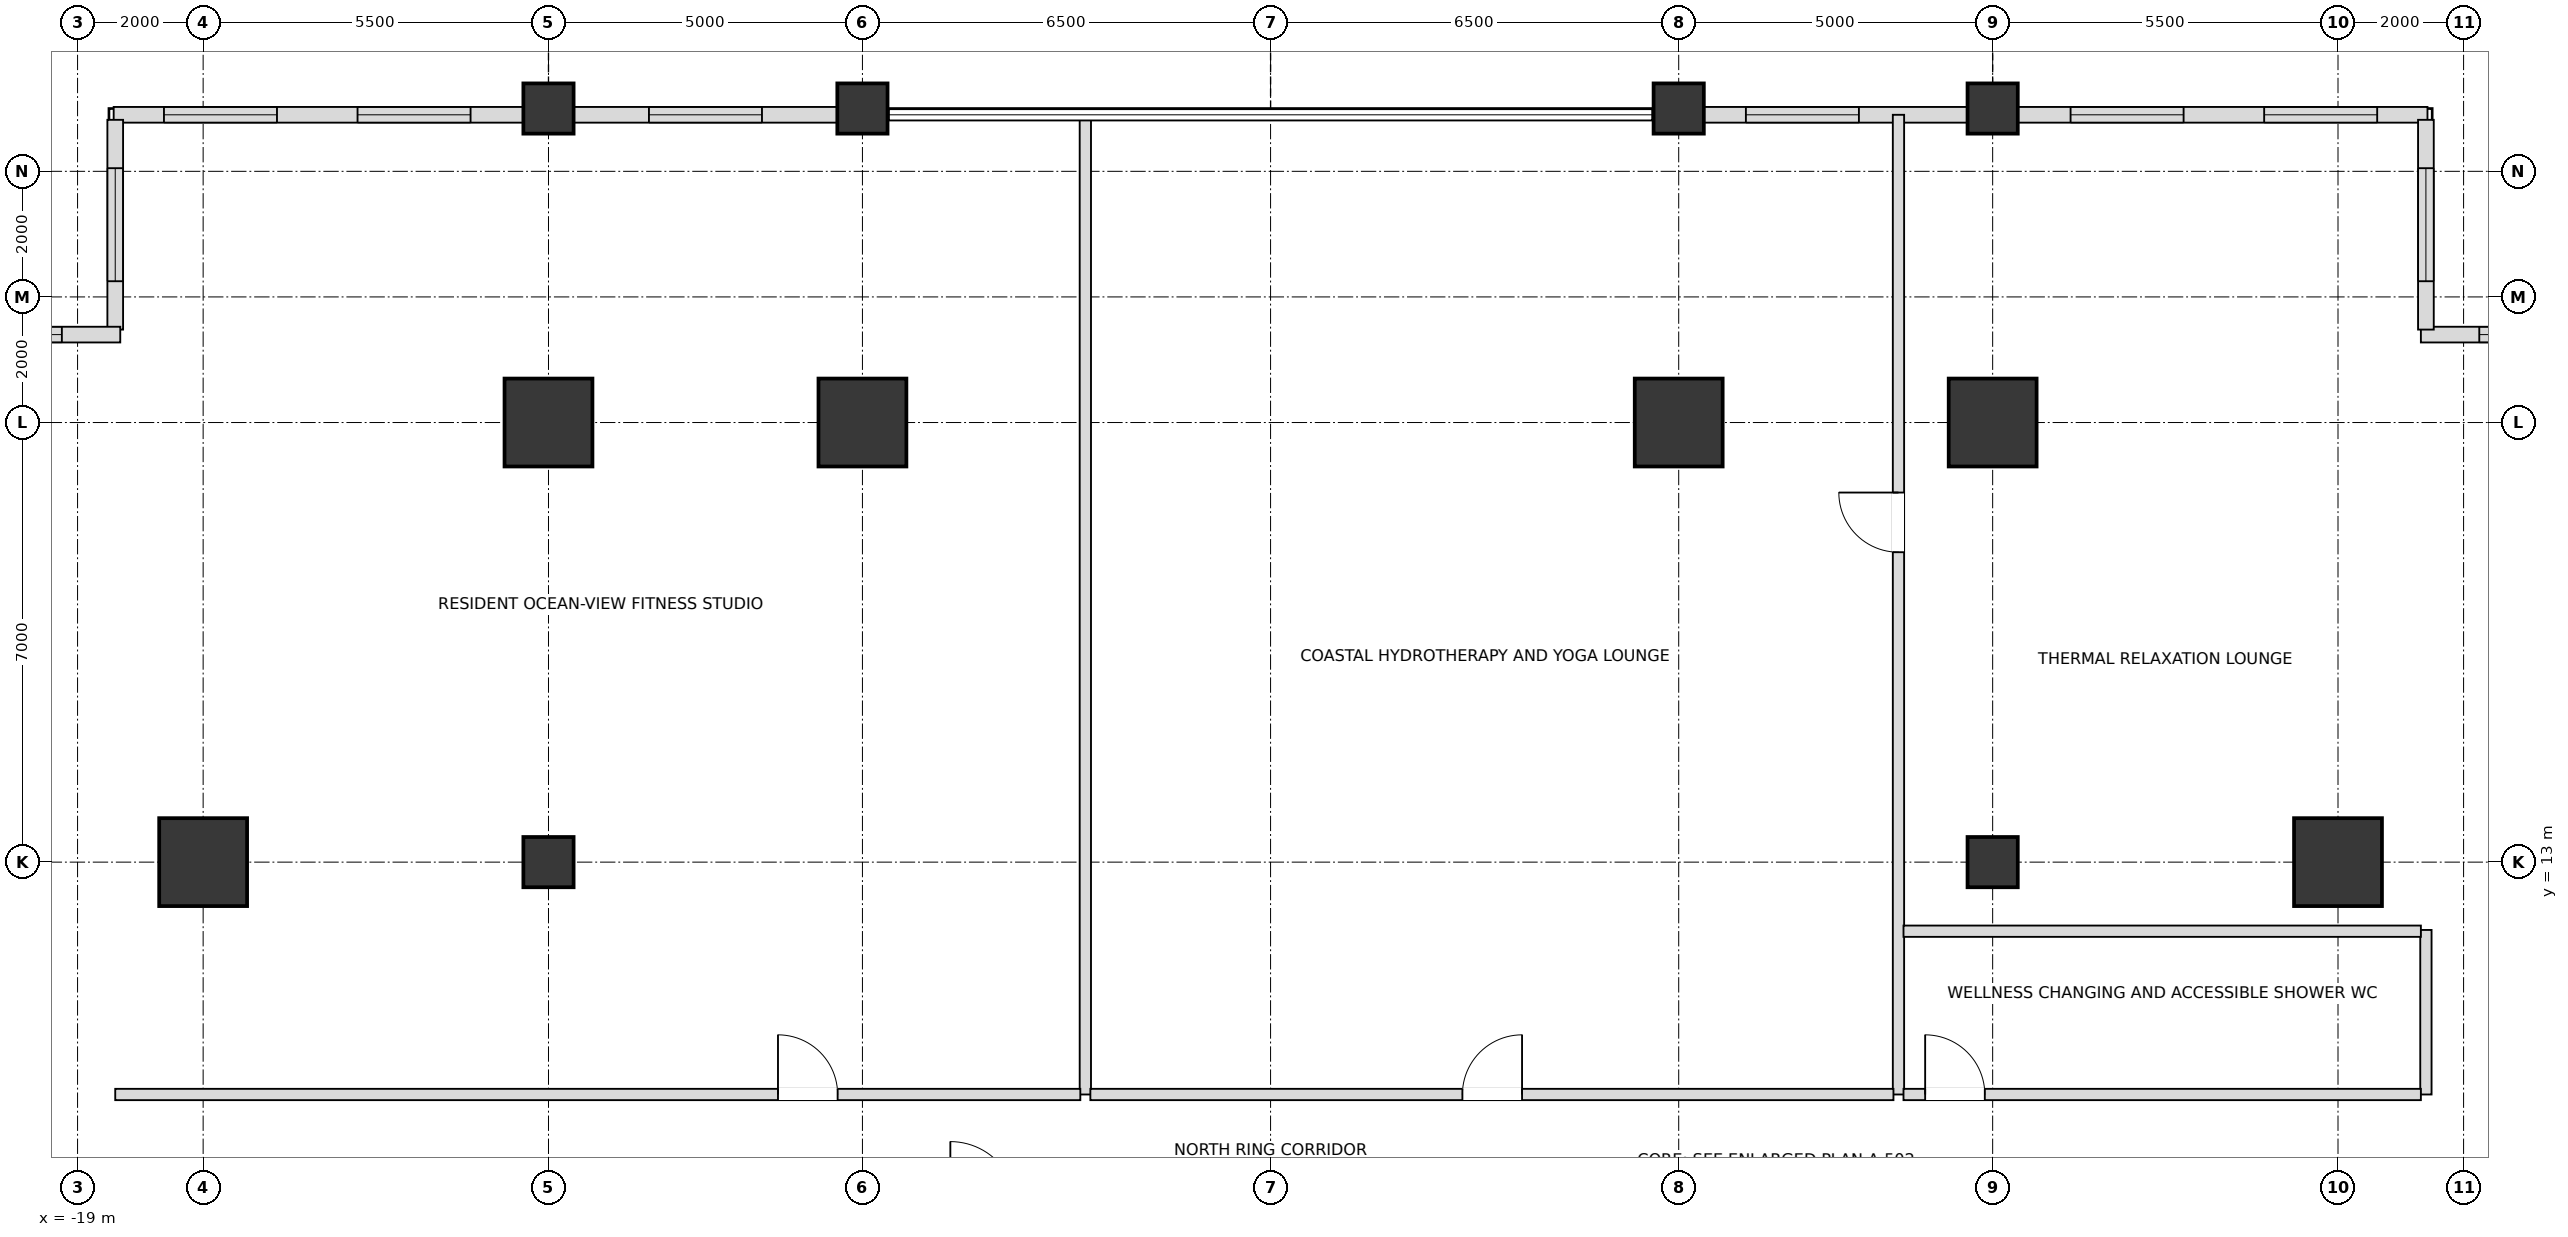
"""IFC4 building model, lengths in metres.
Left out: names, types, materials, properties, quantities, classifications, styles, units other than length and angle.
Written with IfcOpenShell. Run it as: python <this file> out.ifc"""

import sys

from ifc_helpers import new_model, si_unit, direction, frame, frame_2d, origin, origin_2d, place, context, subcontext, project, spatial, rectangle, extrude, element, fill, save


model = new_model("IFC4")
c1 = context("Model", 3, precision=1e-05, world=origin(), true_north=direction((0.0, 1.0)))
c2 = subcontext(c1, "Body", "Model", "MODEL_VIEW")
j1 = project(units=[si_unit("LENGTHUNIT", "METRE"), si_unit("PLANEANGLEUNIT", "RADIAN")], contexts=[c1])
p1 = place(None, origin())
s1 = spatial("IfcSite", under=j1, at=p1, CompositionType="ELEMENT")
p2 = place(p1, origin())
s2 = spatial("IfcBuilding", under=s1, at=p2, CompositionType="ELEMENT")
p3 = place(p2, frame((0.0, 0.0, 50.4)))
s3 = spatial("IfcBuildingStorey", under=s2, at=p3, CompositionType="ELEMENT", Elevation=50.4)
for number, where, z_axis, x_axis in (
    (1, (17.0, 13.0, 0.0), (0.0, 0.0, 1.0), (1.0, 0.0, 0.0)),
    (2, (11.5, 20.0, 0.0), (0.0, 0.0, 1.0), (1.0, 0.0, 0.0)),
    (3, (6.5, 20.0, 0.0), (0.0, 0.0, 1.0), (1.0, 0.0, 0.0)),
    (4, (-6.5, 20.0, 0.0), (0.0, 0.0, 1.0), (1.0, 0.0, 0.0)),
    (5, (-11.5, 20.0, 0.0), (0.0, 0.0, 1.0), (1.0, 0.0, 0.0)),
    (6, (-17.0, 13.0, 0.0), (0.0, 0.0, 1.0), (1.0, 0.0, 0.0)),
):
    element("IfcColumn", number, at=place(p3, frame(where, z_axis=z_axis, x_axis=x_axis)), inside=s3, PredefinedType="USERDEFINED", context=c2, shape_type="SweptSolid", body=[
        extrude(rectangle(XDim=1.4, YDim=1.4, at=origin_2d()), origin(), (0.0, 0.0, 1.0), 3.6),
    ])
for number, where, z_axis, x_axis in (
    (7, (-11.5, 13.0, 0.0), (0.0, 0.0, 1.0), (1.0, 0.0, 0.0)),
    (8, (11.5, 13.0, 0.0), (0.0, 0.0, 1.0), (1.0, 0.0, 0.0)),
    (9, (-11.5, 25.0, 0.0), (0.0, 0.0, 1.0), (1.0, 0.0, 0.0)),
    (10, (-6.5, 25.0, 0.0), (0.0, 0.0, 1.0), (1.0, 0.0, 0.0)),
    (11, (6.5, 25.0, 0.0), (0.0, 0.0, 1.0), (1.0, 0.0, 0.0)),
    (12, (11.5, 25.0, 0.0), (0.0, 0.0, 1.0), (1.0, 0.0, 0.0)),
):
    element("IfcColumn", number, at=place(p3, frame(where, z_axis=z_axis, x_axis=x_axis)), inside=s3, PredefinedType="COLUMN", context=c2, shape_type="SweptSolid", body=[
        extrude(rectangle(XDim=0.8, YDim=0.8, at=origin_2d()), origin(), (0.0, 0.0, 1.0), 3.6),
    ])
p4 = place(p3, frame((18.425, 24.9, 0.0), z_axis=(0.0, 0.0, 1.0), x_axis=(-1.0, 0.0, 0.0)))
e13 = element("IfcWall", 13, at=p4, inside=s3, PredefinedType="SOLIDWALL", context=c2, shape_type="SweptSolid", body=[
    extrude(rectangle(XDim=6.53, YDim=0.25, at=frame_2d((3.265, 0.0))), origin(), (0.0, 0.0, 1.0), 2.736),
])
p5 = place(p4, frame((0.801, 0.0, 0.72)))
e14 = element("IfcOpeningElement", 14, at=p5, cuts=e13, PredefinedType="OPENING", context=c2, shape_type="SweptSolid", body=[
    extrude(rectangle(XDim=1.8, YDim=1.68, at=frame_2d((0.9, 0.84))), frame((0.0, 0.135, 0.0), z_axis=(0.0, -1.0, 0.0), x_axis=(1.0, 0.0, 0.0)), (0.0, 0.0, 1.0), 0.27),
])
p6 = place(p4, frame((3.884, 0.0, 0.72)))
e15 = element("IfcOpeningElement", 15, at=p6, cuts=e13, PredefinedType="OPENING", context=c2, shape_type="SweptSolid", body=[
    extrude(rectangle(XDim=1.8, YDim=1.68, at=frame_2d((0.9, 0.84))), frame((0.0, 0.135, 0.0), z_axis=(0.0, -1.0, 0.0), x_axis=(1.0, 0.0, 0.0)), (0.0, 0.0, 1.0), 0.27),
])
p7 = place(p3, frame((11.105, 24.9, 0.0), z_axis=(0.0, 0.0, 1.0), x_axis=(-1.0, 0.0, 0.0)))
e16 = element("IfcWall", 16, at=p7, inside=s3, PredefinedType="SOLIDWALL", context=c2, shape_type="SweptSolid", body=[
    extrude(rectangle(XDim=4.21, YDim=0.25, at=frame_2d((2.105, 0.0))), origin(), (0.0, 0.0, 1.0), 2.736),
])
p8 = place(p7, frame((1.735, 0.0, 0.72)))
e17 = element("IfcOpeningElement", 17, at=p8, cuts=e16, PredefinedType="OPENING", context=c2, shape_type="SweptSolid", body=[
    extrude(rectangle(XDim=1.8, YDim=1.68, at=frame_2d((0.9, 0.84))), frame((0.0, 0.135, 0.0), z_axis=(0.0, -1.0, 0.0), x_axis=(1.0, 0.0, 0.0)), (0.0, 0.0, 1.0), 0.27),
])
p9 = place(p3, frame((-6.895, 24.9, 0.0), z_axis=(0.0, 0.0, 1.0), x_axis=(-1.0, 0.0, 0.0)))
e18 = element("IfcWall", 18, at=p9, inside=s3, PredefinedType="SOLIDWALL", context=c2, shape_type="SweptSolid", body=[
    extrude(rectangle(XDim=4.21, YDim=0.25, at=frame_2d((2.105, 0.0))), origin(), (0.0, 0.0, 1.0), 2.736),
])
p10 = place(p9, frame((1.205, 0.0, 0.72)))
e19 = element("IfcOpeningElement", 19, at=p10, cuts=e18, PredefinedType="OPENING", context=c2, shape_type="SweptSolid", body=[
    extrude(rectangle(XDim=1.8, YDim=1.68, at=frame_2d((0.9, 0.84))), frame((0.0, 0.135, 0.0), z_axis=(0.0, -1.0, 0.0), x_axis=(1.0, 0.0, 0.0)), (0.0, 0.0, 1.0), 0.27),
])
p11 = place(p3, frame((-11.895, 24.9, 0.0), z_axis=(0.0, 0.0, 1.0), x_axis=(-1.0, 0.0, 0.0)))
e20 = element("IfcWall", 20, at=p11, inside=s3, PredefinedType="SOLIDWALL", context=c2, shape_type="SweptSolid", body=[
    extrude(rectangle(XDim=6.53, YDim=0.25, at=frame_2d((3.265, 0.0))), origin(), (0.0, 0.0, 1.0), 2.736),
])
p12 = place(p11, frame((0.846, 0.0, 0.72)))
e21 = element("IfcOpeningElement", 21, at=p12, cuts=e20, PredefinedType="OPENING", context=c2, shape_type="SweptSolid", body=[
    extrude(rectangle(XDim=1.8, YDim=1.68, at=frame_2d((0.9, 0.84))), frame((0.0, 0.135, 0.0), z_axis=(0.0, -1.0, 0.0), x_axis=(1.0, 0.0, 0.0)), (0.0, 0.0, 1.0), 0.27),
])
p13 = place(p11, frame((3.929, 0.0, 0.72)))
e22 = element("IfcOpeningElement", 22, at=p13, cuts=e20, PredefinedType="OPENING", context=c2, shape_type="SweptSolid", body=[
    extrude(rectangle(XDim=1.8, YDim=1.68, at=frame_2d((0.9, 0.84))), frame((0.0, 0.135, 0.0), z_axis=(0.0, -1.0, 0.0), x_axis=(1.0, 0.0, 0.0)), (0.0, 0.0, 1.0), 0.27),
])
p14 = place(p3, frame((21.98, 21.4, 0.0), z_axis=(0.0, 0.0, 1.0), x_axis=(-1.0, 0.0, 0.0)))
e23 = element("IfcWall", 23, at=p14, inside=s3, PredefinedType="SOLIDWALL", context=c2, shape_type="SweptSolid", body=[
    extrude(rectangle(XDim=3.66, YDim=0.25, at=frame_2d((1.83, 0.0))), origin(), (0.0, 0.0, 1.0), 2.736),
])
p15 = place(p14, frame((0.93, 0.0, 0.72)))
e24 = element("IfcOpeningElement", 24, at=p15, cuts=e23, PredefinedType="OPENING", context=c2, shape_type="SweptSolid", body=[
    extrude(rectangle(XDim=1.8, YDim=1.68, at=frame_2d((0.9, 0.84))), frame((0.0, 0.135, 0.0), z_axis=(0.0, -1.0, 0.0), x_axis=(1.0, 0.0, 0.0)), (0.0, 0.0, 1.0), 0.27),
])
p16 = place(p3, frame((18.4, 21.48, 0.0), z_axis=(0.0, 0.0, 1.0), x_axis=(0.0, 1.0, 0.0)))
e25 = element("IfcWall", 25, at=p16, inside=s3, PredefinedType="SOLIDWALL", context=c2, shape_type="SweptSolid", body=[
    extrude(rectangle(XDim=3.34, YDim=0.25, at=frame_2d((1.67, 0.0))), origin(), (0.0, 0.0, 1.0), 2.736),
])
p17 = place(p16, frame((0.77, 0.0, 0.72)))
e26 = element("IfcOpeningElement", 26, at=p17, cuts=e25, PredefinedType="OPENING", context=c2, shape_type="SweptSolid", body=[
    extrude(rectangle(XDim=1.8, YDim=1.68, at=frame_2d((0.9, 0.84))), frame((0.0, 0.135, 0.0), z_axis=(0.0, -1.0, 0.0), x_axis=(1.0, 0.0, 0.0)), (0.0, 0.0, 1.0), 0.27),
])
p18 = place(p3, frame((-18.4, 24.82, 0.0), z_axis=(0.0, 0.0, 1.0), x_axis=(0.0, -1.0, 0.0)))
e27 = element("IfcWall", 27, at=p18, inside=s3, PredefinedType="SOLIDWALL", context=c2, shape_type="SweptSolid", body=[
    extrude(rectangle(XDim=3.34, YDim=0.25, at=frame_2d((1.67, 0.0))), origin(), (0.0, 0.0, 1.0), 2.736),
])
p19 = place(p18, frame((0.77, 0.0, 0.72)))
e28 = element("IfcOpeningElement", 28, at=p19, cuts=e27, PredefinedType="OPENING", context=c2, shape_type="SweptSolid", body=[
    extrude(rectangle(XDim=1.8, YDim=1.68, at=frame_2d((0.9, 0.84))), frame((0.0, 0.135, 0.0), z_axis=(0.0, -1.0, 0.0), x_axis=(1.0, 0.0, 0.0)), (0.0, 0.0, 1.0), 0.27),
])
p20 = place(p3, frame((-18.32, 21.4, 0.0), z_axis=(0.0, 0.0, 1.0), x_axis=(-1.0, 0.0, 0.0)))
e29 = element("IfcWall", 29, at=p20, inside=s3, PredefinedType="SOLIDWALL", context=c2, shape_type="SweptSolid", body=[
    extrude(rectangle(XDim=3.66, YDim=0.25, at=frame_2d((1.83, 0.0))), origin(), (0.0, 0.0, 1.0), 2.736),
])
p21 = place(p20, frame((0.93, 0.0, 0.72)))
e30 = element("IfcOpeningElement", 30, at=p21, cuts=e29, PredefinedType="OPENING", context=c2, shape_type="SweptSolid", body=[
    extrude(rectangle(XDim=1.8, YDim=1.68, at=frame_2d((0.9, 0.84))), frame((0.0, 0.135, 0.0), z_axis=(0.0, -1.0, 0.0), x_axis=(1.0, 0.0, 0.0)), (0.0, 0.0, 1.0), 0.27),
])
p22 = place(p3, frame((-2.95, 9.3, 0.0), z_axis=(0.0, 0.0, 1.0), x_axis=(0.0, 1.0, 0.0)))
e31 = element("IfcWall", 31, at=p22, inside=s3, PredefinedType="PARTITIONING", context=c2, shape_type="SweptSolid", body=[
    extrude(rectangle(XDim=15.6, YDim=0.18, at=frame_2d((7.8, 0.0))), origin(), (0.0, 0.0, 1.0), 2.816),
])
p23 = place(p3, frame((10.0, 9.3, 0.0), z_axis=(0.0, 0.0, 1.0), x_axis=(0.0, 1.0, 0.0)))
e32 = element("IfcWall", 32, at=p23, inside=s3, PredefinedType="PARTITIONING", context=c2, shape_type="SweptSolid", body=[
    extrude(rectangle(XDim=15.6, YDim=0.18, at=frame_2d((7.8, 0.0))), origin(), (0.0, 0.0, 1.0), 2.816),
])
p24 = place(p23, frame((8.635, 0.0, 0.0)))
e33 = element("IfcOpeningElement", 33, at=p24, cuts=e32, PredefinedType="OPENING", context=c2, shape_type="SweptSolid", body=[
    extrude(rectangle(XDim=0.95, YDim=2.15, at=frame_2d((0.475, 1.075))), frame((0.0, 0.1, 0.0), z_axis=(0.0, -1.0, 0.0), x_axis=(1.0, 0.0, 0.0)), (0.0, 0.0, 1.0), 0.2),
])
p25 = place(p3, frame((18.4, 9.3, 0.0), z_axis=(0.0, 0.0, 1.0), x_axis=(0.0, 1.0, 0.0)))
e34 = element("IfcWall", 34, at=p25, inside=s3, PredefinedType="PARTITIONING", context=c2, shape_type="SweptSolid", body=[
    extrude(rectangle(XDim=2.62, YDim=0.18, at=frame_2d((1.31, 0.0))), origin(), (0.0, 0.0, 1.0), 3.38),
])
p26 = place(p3, frame((-18.4, 9.3, 0.0), z_axis=(0.0, 0.0, 1.0), x_axis=(1.0, 0.0, 0.0)))
e35 = element("IfcWall", 35, at=p26, inside=s3, PredefinedType="PARTITIONING", context=c2, shape_type="SweptSolid", body=[
    extrude(rectangle(XDim=15.37, YDim=0.18, at=frame_2d((7.685, 0.0))), origin(), (0.0, 0.0, 1.0), 2.816),
])
p27 = place(p26, frame((10.555, 0.0, 0.0)))
e36 = element("IfcOpeningElement", 36, at=p27, cuts=e35, PredefinedType="OPENING", context=c2, shape_type="SweptSolid", body=[
    extrude(rectangle(XDim=0.95, YDim=2.15, at=frame_2d((0.475, 1.075))), frame((0.0, 0.1, 0.0), z_axis=(0.0, -1.0, 0.0), x_axis=(1.0, 0.0, 0.0)), (0.0, 0.0, 1.0), 0.2),
])
p28 = place(p3, frame((-2.87, 9.3, 0.0), z_axis=(0.0, 0.0, 1.0), x_axis=(1.0, 0.0, 0.0)))
e37 = element("IfcWall", 37, at=p28, inside=s3, PredefinedType="PARTITIONING", context=c2, shape_type="SweptSolid", body=[
    extrude(rectangle(XDim=12.79, YDim=0.18, at=frame_2d((6.395, 0.0))), origin(), (0.0, 0.0, 1.0), 2.816),
])
p29 = place(p28, frame((5.925, 0.0, 0.0)))
e38 = element("IfcOpeningElement", 38, at=p29, cuts=e37, PredefinedType="OPENING", context=c2, shape_type="SweptSolid", body=[
    extrude(rectangle(XDim=0.95, YDim=2.15, at=frame_2d((0.475, 1.075))), frame((0.0, 0.1, 0.0), z_axis=(0.0, -1.0, 0.0), x_axis=(1.0, 0.0, 0.0)), (0.0, 0.0, 1.0), 0.2),
])
p30 = place(p3, frame((10.08, 9.3, 0.0), z_axis=(0.0, 0.0, 1.0), x_axis=(1.0, 0.0, 0.0)))
e39 = element("IfcWall", 39, at=p30, inside=s3, PredefinedType="PARTITIONING", context=c2, shape_type="SweptSolid", body=[
    extrude(rectangle(XDim=8.24, YDim=0.18, at=frame_2d((4.12, 0.0))), origin(), (0.0, 0.0, 1.0), 2.816),
])
p31 = place(p30, frame((0.345, 0.0, 0.0)))
e40 = element("IfcOpeningElement", 40, at=p31, cuts=e39, PredefinedType="OPENING", context=c2, shape_type="SweptSolid", body=[
    extrude(rectangle(XDim=0.95, YDim=2.15, at=frame_2d((0.475, 1.075))), frame((0.0, 0.1, 0.0), z_axis=(0.0, -1.0, 0.0), x_axis=(1.0, 0.0, 0.0)), (0.0, 0.0, 1.0), 0.2),
])
p32 = place(p3, frame((10.08, 11.9, 0.0), z_axis=(0.0, 0.0, 1.0), x_axis=(1.0, 0.0, 0.0)))
e41 = element("IfcWall", 41, at=p32, inside=s3, PredefinedType="PARTITIONING", context=c2, shape_type="SweptSolid", body=[
    extrude(rectangle(XDim=8.24, YDim=0.18, at=frame_2d((4.12, 0.0))), origin(), (0.0, 0.0, 1.0), 2.816),
])
p33 = place(p5, origin())
e42 = element("IfcWindow", 42, at=p33, inside=s3, PartitioningType="SINGLE_PANEL", PredefinedType="WINDOW", context=c2, shape_type="SweptSolid", body=[
    extrude(rectangle(XDim=1.8, YDim=1.68, at=frame_2d((0.9, 0.84))), frame((0.0, 0.03, 0.0), z_axis=(0.0, -1.0, 0.0), x_axis=(1.0, 0.0, 0.0)), (0.0, 0.0, 1.0), 0.06),
])
fill(e14, e42)
p34 = place(p6, origin())
e43 = element("IfcWindow", 43, at=p34, inside=s3, PartitioningType="SINGLE_PANEL", PredefinedType="WINDOW", context=c2, shape_type="SweptSolid", body=[
    extrude(rectangle(XDim=1.8, YDim=1.68, at=frame_2d((0.9, 0.84))), frame((0.0, 0.03, 0.0), z_axis=(0.0, -1.0, 0.0), x_axis=(1.0, 0.0, 0.0)), (0.0, 0.0, 1.0), 0.06),
])
fill(e15, e43)
p35 = place(p8, origin())
e44 = element("IfcWindow", 44, at=p35, inside=s3, PartitioningType="SINGLE_PANEL", PredefinedType="WINDOW", context=c2, shape_type="SweptSolid", body=[
    extrude(rectangle(XDim=1.8, YDim=1.68, at=frame_2d((0.9, 0.84))), frame((0.0, 0.03, 0.0), z_axis=(0.0, -1.0, 0.0), x_axis=(1.0, 0.0, 0.0)), (0.0, 0.0, 1.0), 0.06),
])
fill(e17, e44)
p36 = place(p10, origin())
e45 = element("IfcWindow", 45, at=p36, inside=s3, PartitioningType="SINGLE_PANEL", PredefinedType="WINDOW", context=c2, shape_type="SweptSolid", body=[
    extrude(rectangle(XDim=1.8, YDim=1.68, at=frame_2d((0.9, 0.84))), frame((0.0, 0.03, 0.0), z_axis=(0.0, -1.0, 0.0), x_axis=(1.0, 0.0, 0.0)), (0.0, 0.0, 1.0), 0.06),
])
fill(e19, e45)
p37 = place(p12, origin())
e46 = element("IfcWindow", 46, at=p37, inside=s3, PartitioningType="SINGLE_PANEL", PredefinedType="WINDOW", context=c2, shape_type="SweptSolid", body=[
    extrude(rectangle(XDim=1.8, YDim=1.68, at=frame_2d((0.9, 0.84))), frame((0.0, 0.03, 0.0), z_axis=(0.0, -1.0, 0.0), x_axis=(1.0, 0.0, 0.0)), (0.0, 0.0, 1.0), 0.06),
])
fill(e21, e46)
p38 = place(p13, origin())
e47 = element("IfcWindow", 47, at=p38, inside=s3, PartitioningType="SINGLE_PANEL", PredefinedType="WINDOW", context=c2, shape_type="SweptSolid", body=[
    extrude(rectangle(XDim=1.8, YDim=1.68, at=frame_2d((0.9, 0.84))), frame((0.0, 0.03, 0.0), z_axis=(0.0, -1.0, 0.0), x_axis=(1.0, 0.0, 0.0)), (0.0, 0.0, 1.0), 0.06),
])
fill(e22, e47)
p39 = place(p15, origin())
e48 = element("IfcWindow", 48, at=p39, inside=s3, PartitioningType="SINGLE_PANEL", PredefinedType="WINDOW", context=c2, shape_type="SweptSolid", body=[
    extrude(rectangle(XDim=1.8, YDim=1.68, at=frame_2d((0.9, 0.84))), frame((0.0, 0.03, 0.0), z_axis=(0.0, -1.0, 0.0), x_axis=(1.0, 0.0, 0.0)), (0.0, 0.0, 1.0), 0.06),
])
fill(e24, e48)
p40 = place(p17, origin())
e49 = element("IfcWindow", 49, at=p40, inside=s3, PartitioningType="SINGLE_PANEL", PredefinedType="WINDOW", context=c2, shape_type="SweptSolid", body=[
    extrude(rectangle(XDim=1.8, YDim=1.68, at=frame_2d((0.9, 0.84))), frame((0.0, 0.03, 0.0), z_axis=(0.0, -1.0, 0.0), x_axis=(1.0, 0.0, 0.0)), (0.0, 0.0, 1.0), 0.06),
])
fill(e26, e49)
p41 = place(p19, origin())
e50 = element("IfcWindow", 50, at=p41, inside=s3, PartitioningType="SINGLE_PANEL", PredefinedType="WINDOW", context=c2, shape_type="SweptSolid", body=[
    extrude(rectangle(XDim=1.8, YDim=1.68, at=frame_2d((0.9, 0.84))), frame((0.0, 0.03, 0.0), z_axis=(0.0, -1.0, 0.0), x_axis=(1.0, 0.0, 0.0)), (0.0, 0.0, 1.0), 0.06),
])
fill(e28, e50)
p42 = place(p21, origin())
e51 = element("IfcWindow", 51, at=p42, inside=s3, PartitioningType="SINGLE_PANEL", PredefinedType="WINDOW", context=c2, shape_type="SweptSolid", body=[
    extrude(rectangle(XDim=1.8, YDim=1.68, at=frame_2d((0.9, 0.84))), frame((0.0, 0.03, 0.0), z_axis=(0.0, -1.0, 0.0), x_axis=(1.0, 0.0, 0.0)), (0.0, 0.0, 1.0), 0.06),
])
fill(e30, e51)
p43 = place(p31, origin())
e52 = element("IfcDoor", 52, at=p43, inside=s3, OperationType="SINGLE_SWING_LEFT", PredefinedType="DOOR", context=c2, shape_type="SweptSolid", body=[
    extrude(rectangle(XDim=0.95, YDim=2.15, at=frame_2d((0.475, 1.075))), frame((0.0, 0.025, 0.0), z_axis=(0.0, -1.0, 0.0), x_axis=(1.0, 0.0, 0.0)), (0.0, 0.0, 1.0), 0.05),
])
fill(e40, e52)
p44 = place(p24, origin())
e53 = element("IfcDoor", 53, at=p44, inside=s3, OperationType="SINGLE_SWING_RIGHT", PredefinedType="DOOR", context=c2, shape_type="SweptSolid", body=[
    extrude(rectangle(XDim=0.95, YDim=2.15, at=frame_2d((0.475, 1.075))), frame((0.0, 0.025, 0.0), z_axis=(0.0, -1.0, 0.0), x_axis=(1.0, 0.0, 0.0)), (0.0, 0.0, 1.0), 0.05),
])
fill(e33, e53)
p45 = place(p27, origin())
e54 = element("IfcDoor", 54, at=p45, inside=s3, OperationType="SINGLE_SWING_LEFT", PredefinedType="DOOR", context=c2, shape_type="SweptSolid", body=[
    extrude(rectangle(XDim=0.95, YDim=2.15, at=frame_2d((0.475, 1.075))), frame((0.0, 0.025, 0.0), z_axis=(0.0, -1.0, 0.0), x_axis=(1.0, 0.0, 0.0)), (0.0, 0.0, 1.0), 0.05),
])
fill(e36, e54)
p46 = place(p29, origin())
e55 = element("IfcDoor", 55, at=p46, inside=s3, OperationType="SINGLE_SWING_RIGHT", PredefinedType="DOOR", context=c2, shape_type="SweptSolid", body=[
    extrude(rectangle(XDim=0.95, YDim=2.15, at=frame_2d((0.475, 1.075))), frame((0.0, 0.025, 0.0), z_axis=(0.0, -1.0, 0.0), x_axis=(1.0, 0.0, 0.0)), (0.0, 0.0, 1.0), 0.05),
])
fill(e38, e55)
save(model, sys.argv[1])
